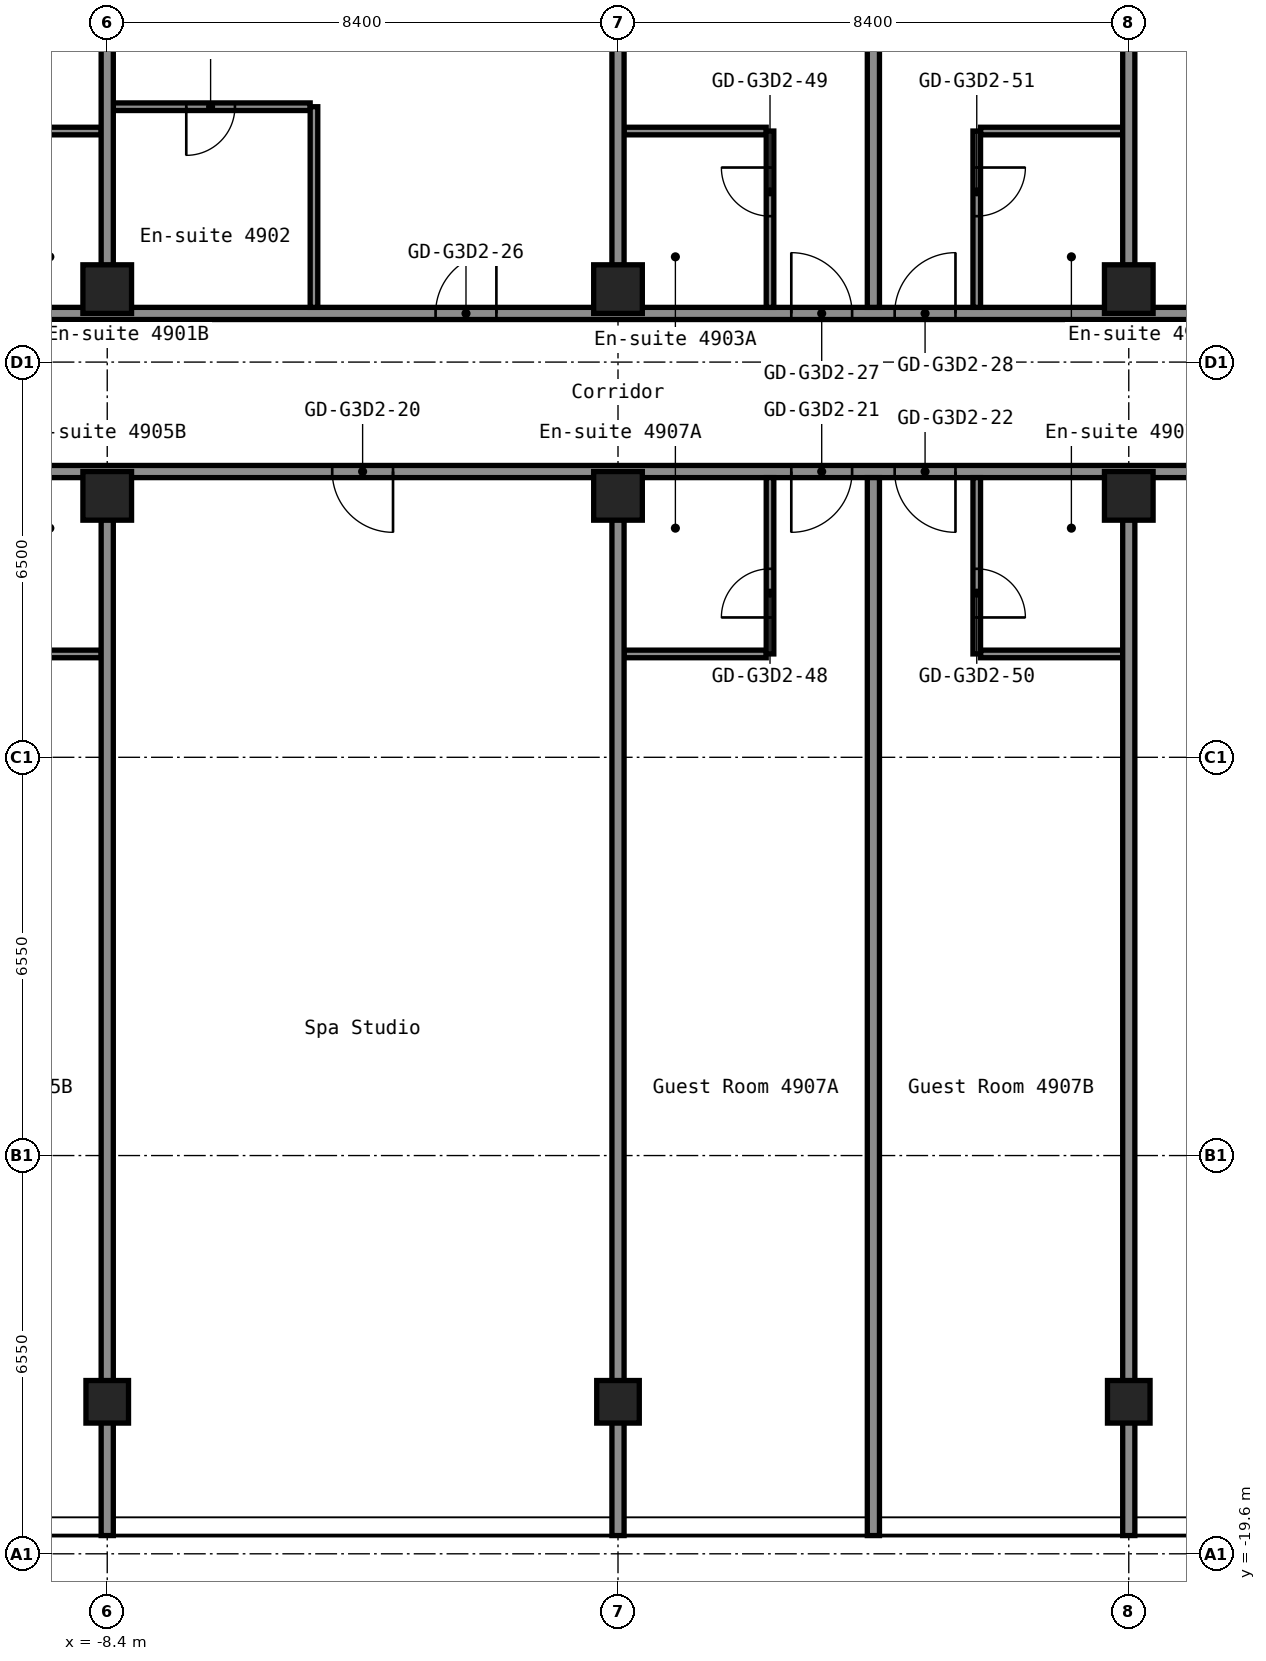
"""IFC4 building model, lengths in metres.
Left out: names, types, materials, properties, quantities, classifications, styles, units other than length and angle.
Written with IfcOpenShell. Run it as: python <this file> out.ifc"""

import sys

from ifc_helpers import new_model, si_unit, direction, frame, frame_2d, origin, origin_2d, place, context, subcontext, project, spatial, rectangle, hollow_rectangle, extrude, element, fill, save


model = new_model("IFC4")
c1 = context("Model", 3, precision=1e-05, world=origin(), true_north=direction((0.0, 1.0)))
c2 = subcontext(c1, "Body", "Model", "MODEL_VIEW")
j1 = project(units=[si_unit("LENGTHUNIT", "METRE"), si_unit("PLANEANGLEUNIT", "RADIAN")], contexts=[c1])
p1 = place(None, origin())
s1 = spatial("IfcSite", under=j1, at=p1, CompositionType="ELEMENT")
p2 = place(p1, origin())
s2 = spatial("IfcBuilding", under=s1, at=p2, CompositionType="ELEMENT")
p3 = place(p2, frame((0.0, 0.0, 172.6)))
s3 = spatial("IfcBuildingStorey", under=s2, at=p3, CompositionType="ELEMENT", Elevation=172.6)
p4 = place(p3, frame((-8.4, -17.1, 0.0), z_axis=(0.0, 0.0, 1.0), x_axis=(1.0, 0.0, 0.0)))
e1 = element("IfcColumn", 1, at=p4, inside=s3, PredefinedType="COLUMN", context=c2, shape_type="SweptSolid", body=[
    extrude(hollow_rectangle(XDim=0.7, YDim=0.7, WallThickness=0.028, at=origin_2d()), origin(), (0.0, 0.0, 1.0), 2.9),
])
for number, where, z_axis, x_axis in (
    (2, (-8.4, -2.2, 0.0), (0.0, 0.0, 1.0), (1.0, 0.0, 0.0)),
    (3, (-8.4, 1.2, 0.0), (0.0, 0.0, 1.0), (1.0, 0.0, 0.0)),
):
    element("IfcColumn", number, at=place(p3, frame(where, z_axis=z_axis, x_axis=x_axis)), inside=s3, PredefinedType="COLUMN", context=c2, shape_type="SweptSolid", body=[
        extrude(hollow_rectangle(XDim=0.8, YDim=0.8, WallThickness=0.032, at=origin_2d()), origin(), (0.0, 0.0, 1.0), 2.9),
    ])
p5 = place(p3, frame((0.0, -17.1, 0.0), z_axis=(0.0, 0.0, 1.0), x_axis=(1.0, 0.0, 0.0)))
e4 = element("IfcColumn", 4, at=p5, inside=s3, PredefinedType="COLUMN", context=c2, shape_type="SweptSolid", body=[
    extrude(hollow_rectangle(XDim=0.7, YDim=0.7, WallThickness=0.028, at=origin_2d()), origin(), (0.0, 0.0, 1.0), 2.9),
])
for number, where, z_axis, x_axis in (
    (5, (0.0, -2.2, 0.0), (0.0, 0.0, 1.0), (1.0, 0.0, 0.0)),
    (6, (0.0, 1.2, 0.0), (0.0, 0.0, 1.0), (1.0, 0.0, 0.0)),
):
    element("IfcColumn", number, at=place(p3, frame(where, z_axis=z_axis, x_axis=x_axis)), inside=s3, PredefinedType="COLUMN", context=c2, shape_type="SweptSolid", body=[
        extrude(hollow_rectangle(XDim=0.8, YDim=0.8, WallThickness=0.032, at=origin_2d()), origin(), (0.0, 0.0, 1.0), 2.9),
    ])
p6 = place(p3, frame((8.4, -17.1, 0.0), z_axis=(0.0, 0.0, 1.0), x_axis=(1.0, 0.0, 0.0)))
e7 = element("IfcColumn", 7, at=p6, inside=s3, PredefinedType="COLUMN", context=c2, shape_type="SweptSolid", body=[
    extrude(hollow_rectangle(XDim=0.7, YDim=0.7, WallThickness=0.028, at=origin_2d()), origin(), (0.0, 0.0, 1.0), 2.9),
])
for number, where, z_axis, x_axis in (
    (8, (8.4, -2.2, 0.0), (0.0, 0.0, 1.0), (1.0, 0.0, 0.0)),
    (9, (8.4, 1.2, 0.0), (0.0, 0.0, 1.0), (1.0, 0.0, 0.0)),
):
    element("IfcColumn", number, at=place(p3, frame(where, z_axis=z_axis, x_axis=x_axis)), inside=s3, PredefinedType="COLUMN", context=c2, shape_type="SweptSolid", body=[
        extrude(hollow_rectangle(XDim=0.8, YDim=0.8, WallThickness=0.032, at=origin_2d()), origin(), (0.0, 0.0, 1.0), 2.9),
    ])
for number, where, z_axis, x_axis in (
    (10, (-10.837, -4.8, 0.0), (0.0, 0.0, 1.0), (1.0, 0.0, 0.0)),
    (11, (0.1, -4.8, 0.0), (0.0, 0.0, 1.0), (1.0, 0.0, 0.0)),
):
    element("IfcWall", number, at=place(p3, frame(where, z_axis=z_axis, x_axis=x_axis)), inside=s3, PredefinedType="PARTITIONING", context=c2, shape_type="SweptSolid", body=[
        extrude(rectangle(XDim=2.337, YDim=0.125, at=frame_2d((1.169, 0.0))), origin(), (0.0, 0.0, 1.0), 2.9),
    ])
p7 = place(p3, frame((5.962, -4.8, 0.0), z_axis=(0.0, 0.0, 1.0), x_axis=(1.0, 0.0, 0.0)))
e12 = element("IfcWall", 12, at=p7, inside=s3, PredefinedType="PARTITIONING", context=c2, shape_type="SweptSolid", body=[
    extrude(rectangle(XDim=2.338, YDim=0.125, at=frame_2d((1.169, 0.0))), origin(), (0.0, 0.0, 1.0), 2.9),
])
p8 = place(p3, frame((-16.8, -1.8, 0.0), z_axis=(0.0, 0.0, 1.0), x_axis=(1.0, 0.0, 0.0)))
e13 = element("IfcWall", 13, at=p8, inside=s3, PredefinedType="PARTITIONING", context=c2, shape_type="SweptSolid", body=[
    extrude(rectangle(XDim=33.6, YDim=0.2, at=frame_2d((16.8, 0.0))), origin(), (0.0, 0.0, 1.0), 2.9),
])
p9 = place(p8, frame((2.85, 0.0, 0.0)))
e14 = element("IfcOpeningElement", 14, at=p9, cuts=e13, PredefinedType="OPENING", context=c2, shape_type="SweptSolid", body=[
    extrude(rectangle(XDim=1.0, YDim=2.1, at=frame_2d((0.5, 1.05))), frame((0.0, 0.11, 0.0), z_axis=(0.0, -1.0, 0.0), x_axis=(1.0, 0.0, 0.0)), (0.0, 0.0, 1.0), 0.22),
])
p10 = place(p8, frame((4.55, 0.0, 0.0)))
e15 = element("IfcOpeningElement", 15, at=p10, cuts=e13, PredefinedType="OPENING", context=c2, shape_type="SweptSolid", body=[
    extrude(rectangle(XDim=1.0, YDim=2.1, at=frame_2d((0.5, 1.05))), frame((0.0, 0.11, 0.0), z_axis=(0.0, -1.0, 0.0), x_axis=(1.0, 0.0, 0.0)), (0.0, 0.0, 1.0), 0.22),
])
p11 = place(p8, frame((12.1, 0.0, 0.0)))
e16 = element("IfcOpeningElement", 16, at=p11, cuts=e13, PredefinedType="OPENING", context=c2, shape_type="SweptSolid", body=[
    extrude(rectangle(XDim=1.0, YDim=2.1, at=frame_2d((0.5, 1.05))), frame((0.0, 0.11, 0.0), z_axis=(0.0, -1.0, 0.0), x_axis=(1.0, 0.0, 0.0)), (0.0, 0.0, 1.0), 0.22),
])
p12 = place(p8, frame((19.65, 0.0, 0.0)))
e17 = element("IfcOpeningElement", 17, at=p12, cuts=e13, PredefinedType="OPENING", context=c2, shape_type="SweptSolid", body=[
    extrude(rectangle(XDim=1.0, YDim=2.1, at=frame_2d((0.5, 1.05))), frame((0.0, 0.11, 0.0), z_axis=(0.0, -1.0, 0.0), x_axis=(1.0, 0.0, 0.0)), (0.0, 0.0, 1.0), 0.22),
])
p13 = place(p8, frame((21.35, 0.0, 0.0)))
e18 = element("IfcOpeningElement", 18, at=p13, cuts=e13, PredefinedType="OPENING", context=c2, shape_type="SweptSolid", body=[
    extrude(rectangle(XDim=1.0, YDim=2.1, at=frame_2d((0.5, 1.05))), frame((0.0, 0.11, 0.0), z_axis=(0.0, -1.0, 0.0), x_axis=(1.0, 0.0, 0.0)), (0.0, 0.0, 1.0), 0.22),
])
p14 = place(p8, frame((27.2, 0.0, 0.0)))
e19 = element("IfcOpeningElement", 19, at=p14, cuts=e13, PredefinedType="OPENING", context=c2, shape_type="SweptSolid", body=[
    extrude(rectangle(XDim=1.0, YDim=2.1, at=frame_2d((0.5, 1.05))), frame((0.0, 0.11, 0.0), z_axis=(0.0, -1.0, 0.0), x_axis=(1.0, 0.0, 0.0)), (0.0, 0.0, 1.0), 0.22),
])
p15 = place(p3, frame((-16.8, 0.8, 0.0), z_axis=(0.0, 0.0, 1.0), x_axis=(1.0, 0.0, 0.0)))
e20 = element("IfcWall", 20, at=p15, inside=s3, PredefinedType="PARTITIONING", context=c2, shape_type="SweptSolid", body=[
    extrude(rectangle(XDim=33.6, YDim=0.2, at=frame_2d((16.8, 0.0))), origin(), (0.0, 0.0, 1.0), 2.9),
])
p16 = place(p15, frame((2.85, 0.0, 0.0)))
e21 = element("IfcOpeningElement", 21, at=p16, cuts=e20, PredefinedType="OPENING", context=c2, shape_type="SweptSolid", body=[
    extrude(rectangle(XDim=1.0, YDim=2.1, at=frame_2d((0.5, 1.05))), frame((0.0, 0.11, 0.0), z_axis=(0.0, -1.0, 0.0), x_axis=(1.0, 0.0, 0.0)), (0.0, 0.0, 1.0), 0.22),
])
p17 = place(p15, frame((4.55, 0.0, 0.0)))
e22 = element("IfcOpeningElement", 22, at=p17, cuts=e20, PredefinedType="OPENING", context=c2, shape_type="SweptSolid", body=[
    extrude(rectangle(XDim=1.0, YDim=2.1, at=frame_2d((0.5, 1.05))), frame((0.0, 0.11, 0.0), z_axis=(0.0, -1.0, 0.0), x_axis=(1.0, 0.0, 0.0)), (0.0, 0.0, 1.0), 0.22),
])
p18 = place(p15, frame((13.8, 0.0, 0.0)))
e23 = element("IfcOpeningElement", 23, at=p18, cuts=e20, PredefinedType="OPENING", context=c2, shape_type="SweptSolid", body=[
    extrude(rectangle(XDim=1.0, YDim=2.1, at=frame_2d((0.5, 1.05))), frame((0.0, 0.11, 0.0), z_axis=(0.0, -1.0, 0.0), x_axis=(1.0, 0.0, 0.0)), (0.0, 0.0, 1.0), 0.22),
])
p19 = place(p15, frame((19.65, 0.0, 0.0)))
e24 = element("IfcOpeningElement", 24, at=p19, cuts=e20, PredefinedType="OPENING", context=c2, shape_type="SweptSolid", body=[
    extrude(rectangle(XDim=1.0, YDim=2.1, at=frame_2d((0.5, 1.05))), frame((0.0, 0.11, 0.0), z_axis=(0.0, -1.0, 0.0), x_axis=(1.0, 0.0, 0.0)), (0.0, 0.0, 1.0), 0.22),
])
p20 = place(p15, frame((21.35, 0.0, 0.0)))
e25 = element("IfcOpeningElement", 25, at=p20, cuts=e20, PredefinedType="OPENING", context=c2, shape_type="SweptSolid", body=[
    extrude(rectangle(XDim=1.0, YDim=2.1, at=frame_2d((0.5, 1.05))), frame((0.0, 0.11, 0.0), z_axis=(0.0, -1.0, 0.0), x_axis=(1.0, 0.0, 0.0)), (0.0, 0.0, 1.0), 0.22),
])
p21 = place(p15, frame((27.1, 0.0, 0.0)))
e26 = element("IfcOpeningElement", 26, at=p21, cuts=e20, PredefinedType="OPENING", context=c2, shape_type="SweptSolid", body=[
    extrude(rectangle(XDim=1.0, YDim=2.1, at=frame_2d((0.5, 1.05))), frame((0.0, 0.11, 0.0), z_axis=(0.0, -1.0, 0.0), x_axis=(1.0, 0.0, 0.0)), (0.0, 0.0, 1.0), 0.22),
])
for number, where, z_axis, x_axis in (
    (27, (-10.837, 3.8, 0.0), (0.0, 0.0, 1.0), (1.0, 0.0, 0.0)),
    (28, (0.1, 3.8, 0.0), (0.0, 0.0, 1.0), (1.0, 0.0, 0.0)),
):
    element("IfcWall", number, at=place(p3, frame(where, z_axis=z_axis, x_axis=x_axis)), inside=s3, PredefinedType="PARTITIONING", context=c2, shape_type="SweptSolid", body=[
        extrude(rectangle(XDim=2.337, YDim=0.125, at=frame_2d((1.169, 0.0))), origin(), (0.0, 0.0, 1.0), 2.9),
    ])
p22 = place(p3, frame((5.962, 3.8, 0.0), z_axis=(0.0, 0.0, 1.0), x_axis=(1.0, 0.0, 0.0)))
e29 = element("IfcWall", 29, at=p22, inside=s3, PredefinedType="PARTITIONING", context=c2, shape_type="SweptSolid", body=[
    extrude(rectangle(XDim=2.338, YDim=0.125, at=frame_2d((1.169, 0.0))), origin(), (0.0, 0.0, 1.0), 2.9),
])
p23 = place(p3, frame((-8.3, 4.2, 0.0), z_axis=(0.0, 0.0, 1.0), x_axis=(1.0, 0.0, 0.0)))
e30 = element("IfcWall", 30, at=p23, inside=s3, PredefinedType="PARTITIONING", context=c2, shape_type="SweptSolid", body=[
    extrude(rectangle(XDim=3.238, YDim=0.125, at=frame_2d((1.619, 0.0))), origin(), (0.0, 0.0, 1.0), 2.9),
])
p24 = place(p23, frame((1.2, 0.0, 0.0)))
e31 = element("IfcOpeningElement", 31, at=p24, cuts=e30, PredefinedType="OPENING", context=c2, shape_type="SweptSolid", body=[
    extrude(rectangle(XDim=0.8, YDim=2.1, at=frame_2d((0.4, 1.05))), frame((0.0, 0.073, 0.0), z_axis=(0.0, -1.0, 0.0), x_axis=(1.0, 0.0, 0.0)), (0.0, 0.0, 1.0), 0.145),
])
for number, where, z_axis, x_axis in (
    (32, (-8.4, -19.3, 0.0), (0.0, 0.0, 1.0), (0.0, 1.0, 0.0)),
    (33, (-8.4, 1.59, 0.0), (0.0, 0.0, 1.0), (0.0, 1.0, 0.0)),
):
    element("IfcWall", number, at=place(p3, frame(where, z_axis=z_axis, x_axis=x_axis)), inside=s3, PredefinedType="PARTITIONING", context=c2, shape_type="SweptSolid", body=[
        extrude(rectangle(XDim=16.71, YDim=0.2, at=frame_2d((8.355, 0.0))), origin(), (0.0, 0.0, 1.0), 2.9),
    ])
p25 = place(p3, frame((-5.0, 0.9, 0.0), z_axis=(0.0, 0.0, 1.0), x_axis=(0.0, 1.0, 0.0)))
e34 = element("IfcWall", 34, at=p25, inside=s3, PredefinedType="PARTITIONING", context=c2, shape_type="SweptSolid", body=[
    extrude(rectangle(XDim=3.3, YDim=0.125, at=frame_2d((1.65, 0.0))), origin(), (0.0, 0.0, 1.0), 2.9),
])
for number, where, z_axis, x_axis in (
    (35, (0.0, -19.3, 0.0), (0.0, 0.0, 1.0), (0.0, 1.0, 0.0)),
    (36, (0.0, 1.59, 0.0), (0.0, 0.0, 1.0), (0.0, 1.0, 0.0)),
):
    element("IfcWall", number, at=place(p3, frame(where, z_axis=z_axis, x_axis=x_axis)), inside=s3, PredefinedType="PARTITIONING", context=c2, shape_type="SweptSolid", body=[
        extrude(rectangle(XDim=16.71, YDim=0.2, at=frame_2d((8.355, 0.0))), origin(), (0.0, 0.0, 1.0), 2.9),
    ])
p26 = place(p3, frame((2.5, -4.8, 0.0), z_axis=(0.0, 0.0, 1.0), x_axis=(0.0, 1.0, 0.0)))
e37 = element("IfcWall", 37, at=p26, inside=s3, PredefinedType="PARTITIONING", context=c2, shape_type="SweptSolid", body=[
    extrude(rectangle(XDim=2.9, YDim=0.125, at=frame_2d((1.45, 0.0))), origin(), (0.0, 0.0, 1.0), 2.9),
])
p27 = place(p26, frame((0.6, 0.0, 0.0)))
e38 = element("IfcOpeningElement", 38, at=p27, cuts=e37, PredefinedType="OPENING", context=c2, shape_type="SweptSolid", body=[
    extrude(rectangle(XDim=0.8, YDim=2.1, at=frame_2d((0.4, 1.05))), frame((0.0, 0.073, 0.0), z_axis=(0.0, -1.0, 0.0), x_axis=(1.0, 0.0, 0.0)), (0.0, 0.0, 1.0), 0.145),
])
p28 = place(p3, frame((2.5, 0.9, 0.0), z_axis=(0.0, 0.0, 1.0), x_axis=(0.0, 1.0, 0.0)))
e39 = element("IfcWall", 39, at=p28, inside=s3, PredefinedType="PARTITIONING", context=c2, shape_type="SweptSolid", body=[
    extrude(rectangle(XDim=2.9, YDim=0.125, at=frame_2d((1.45, 0.0))), origin(), (0.0, 0.0, 1.0), 2.9),
])
p29 = place(p28, frame((1.5, 0.0, 0.0)))
e40 = element("IfcOpeningElement", 40, at=p29, cuts=e39, PredefinedType="OPENING", context=c2, shape_type="SweptSolid", body=[
    extrude(rectangle(XDim=0.8, YDim=2.1, at=frame_2d((0.4, 1.05))), frame((0.0, 0.073, 0.0), z_axis=(0.0, -1.0, 0.0), x_axis=(1.0, 0.0, 0.0)), (0.0, 0.0, 1.0), 0.145),
])
for number, where, z_axis, x_axis in (
    (41, (4.2, -19.3, 0.0), (0.0, 0.0, 1.0), (0.0, 1.0, 0.0)),
    (42, (4.2, 0.9, 0.0), (0.0, 0.0, 1.0), (0.0, 1.0, 0.0)),
):
    element("IfcWall", number, at=place(p3, frame(where, z_axis=z_axis, x_axis=x_axis)), inside=s3, PredefinedType="PARTITIONING", context=c2, shape_type="SweptSolid", body=[
        extrude(rectangle(XDim=17.4, YDim=0.2, at=frame_2d((8.7, 0.0))), origin(), (0.0, 0.0, 1.0), 2.9),
    ])
p30 = place(p3, frame((5.9, -4.8, 0.0), z_axis=(0.0, 0.0, 1.0), x_axis=(0.0, 1.0, 0.0)))
e43 = element("IfcWall", 43, at=p30, inside=s3, PredefinedType="PARTITIONING", context=c2, shape_type="SweptSolid", body=[
    extrude(rectangle(XDim=2.9, YDim=0.125, at=frame_2d((1.45, 0.0))), origin(), (0.0, 0.0, 1.0), 2.9),
])
p31 = place(p30, frame((0.6, 0.0, 0.0)))
e44 = element("IfcOpeningElement", 44, at=p31, cuts=e43, PredefinedType="OPENING", context=c2, shape_type="SweptSolid", body=[
    extrude(rectangle(XDim=0.8, YDim=2.1, at=frame_2d((0.4, 1.05))), frame((0.0, 0.073, 0.0), z_axis=(0.0, -1.0, 0.0), x_axis=(1.0, 0.0, 0.0)), (0.0, 0.0, 1.0), 0.145),
])
p32 = place(p3, frame((5.9, 0.9, 0.0), z_axis=(0.0, 0.0, 1.0), x_axis=(0.0, 1.0, 0.0)))
e45 = element("IfcWall", 45, at=p32, inside=s3, PredefinedType="PARTITIONING", context=c2, shape_type="SweptSolid", body=[
    extrude(rectangle(XDim=2.9, YDim=0.125, at=frame_2d((1.45, 0.0))), origin(), (0.0, 0.0, 1.0), 2.9),
])
p33 = place(p32, frame((1.5, 0.0, 0.0)))
e46 = element("IfcOpeningElement", 46, at=p33, cuts=e45, PredefinedType="OPENING", context=c2, shape_type="SweptSolid", body=[
    extrude(rectangle(XDim=0.8, YDim=2.1, at=frame_2d((0.4, 1.05))), frame((0.0, 0.073, 0.0), z_axis=(0.0, -1.0, 0.0), x_axis=(1.0, 0.0, 0.0)), (0.0, 0.0, 1.0), 0.145),
])
for number, where, z_axis, x_axis in (
    (47, (8.4, -19.3, 0.0), (0.0, 0.0, 1.0), (0.0, 1.0, 0.0)),
    (48, (8.4, 1.59, 0.0), (0.0, 0.0, 1.0), (0.0, 1.0, 0.0)),
):
    element("IfcWall", number, at=place(p3, frame(where, z_axis=z_axis, x_axis=x_axis)), inside=s3, PredefinedType="PARTITIONING", context=c2, shape_type="SweptSolid", body=[
        extrude(rectangle(XDim=16.71, YDim=0.2, at=frame_2d((8.355, 0.0))), origin(), (0.0, 0.0, 1.0), 2.9),
    ])
p34 = place(p11, origin())
e49 = element("IfcDoor", 49, at=p34, inside=s3, OperationType="SINGLE_SWING_RIGHT", PredefinedType="DOOR", context=c2, shape_type="SweptSolid", body=[
    extrude(rectangle(XDim=1.0, YDim=2.1, at=frame_2d((0.5, 1.05))), frame((0.0, 0.025, 0.0), z_axis=(0.0, -1.0, 0.0), x_axis=(1.0, 0.0, 0.0)), (0.0, 0.0, 1.0), 0.05),
])
fill(e16, e49)
p35 = place(p12, origin())
e50 = element("IfcDoor", 50, at=p35, inside=s3, OperationType="SINGLE_SWING_LEFT", PredefinedType="DOOR", context=c2, shape_type="SweptSolid", body=[
    extrude(rectangle(XDim=1.0, YDim=2.1, at=frame_2d((0.5, 1.05))), frame((0.0, 0.025, 0.0), z_axis=(0.0, -1.0, 0.0), x_axis=(1.0, 0.0, 0.0)), (0.0, 0.0, 1.0), 0.05),
])
fill(e17, e50)
p36 = place(p13, origin())
e51 = element("IfcDoor", 51, at=p36, inside=s3, OperationType="SINGLE_SWING_RIGHT", PredefinedType="DOOR", context=c2, shape_type="SweptSolid", body=[
    extrude(rectangle(XDim=1.0, YDim=2.1, at=frame_2d((0.5, 1.05))), frame((0.0, 0.025, 0.0), z_axis=(0.0, -1.0, 0.0), x_axis=(1.0, 0.0, 0.0)), (0.0, 0.0, 1.0), 0.05),
])
fill(e18, e51)
p37 = place(p18, origin())
e52 = element("IfcDoor", 52, at=p37, inside=s3, OperationType="SINGLE_SWING_LEFT", PredefinedType="DOOR", context=c2, shape_type="SweptSolid", body=[
    extrude(rectangle(XDim=1.0, YDim=2.1, at=frame_2d((0.5, 1.05))), frame((0.0, 0.025, 0.0), z_axis=(0.0, -1.0, 0.0), x_axis=(1.0, 0.0, 0.0)), (0.0, 0.0, 1.0), 0.05),
])
fill(e23, e52)
p38 = place(p19, origin())
e53 = element("IfcDoor", 53, at=p38, inside=s3, OperationType="SINGLE_SWING_RIGHT", PredefinedType="DOOR", context=c2, shape_type="SweptSolid", body=[
    extrude(rectangle(XDim=1.0, YDim=2.1, at=frame_2d((0.5, 1.05))), frame((0.0, 0.025, 0.0), z_axis=(0.0, -1.0, 0.0), x_axis=(1.0, 0.0, 0.0)), (0.0, 0.0, 1.0), 0.05),
])
fill(e24, e53)
p39 = place(p20, origin())
e54 = element("IfcDoor", 54, at=p39, inside=s3, OperationType="SINGLE_SWING_LEFT", PredefinedType="DOOR", context=c2, shape_type="SweptSolid", body=[
    extrude(rectangle(XDim=1.0, YDim=2.1, at=frame_2d((0.5, 1.05))), frame((0.0, 0.025, 0.0), z_axis=(0.0, -1.0, 0.0), x_axis=(1.0, 0.0, 0.0)), (0.0, 0.0, 1.0), 0.05),
])
fill(e25, e54)
p40 = place(p24, origin())
e55 = element("IfcDoor", 55, at=p40, inside=s3, OperationType="SINGLE_SWING_LEFT", PredefinedType="DOOR", context=c2, shape_type="SweptSolid", body=[
    extrude(rectangle(XDim=0.8, YDim=2.1, at=frame_2d((0.4, 1.05))), frame((0.0, 0.025, 0.0), z_axis=(0.0, -1.0, 0.0), x_axis=(1.0, 0.0, 0.0)), (0.0, 0.0, 1.0), 0.05),
])
fill(e31, e55)
p41 = place(p27, origin())
e56 = element("IfcDoor", 56, at=p41, inside=s3, OperationType="SINGLE_SWING_RIGHT", PredefinedType="DOOR", context=c2, shape_type="SweptSolid", body=[
    extrude(rectangle(XDim=0.8, YDim=2.1, at=frame_2d((0.4, 1.05))), frame((0.0, 0.025, 0.0), z_axis=(0.0, -1.0, 0.0), x_axis=(1.0, 0.0, 0.0)), (0.0, 0.0, 1.0), 0.05),
])
fill(e38, e56)
p42 = place(p29, origin())
e57 = element("IfcDoor", 57, at=p42, inside=s3, OperationType="SINGLE_SWING_LEFT", PredefinedType="DOOR", context=c2, shape_type="SweptSolid", body=[
    extrude(rectangle(XDim=0.8, YDim=2.1, at=frame_2d((0.4, 1.05))), frame((0.0, 0.025, 0.0), z_axis=(0.0, -1.0, 0.0), x_axis=(1.0, 0.0, 0.0)), (0.0, 0.0, 1.0), 0.05),
])
fill(e40, e57)
p43 = place(p31, origin())
e58 = element("IfcDoor", 58, at=p43, inside=s3, OperationType="SINGLE_SWING_LEFT", PredefinedType="DOOR", context=c2, shape_type="SweptSolid", body=[
    extrude(rectangle(XDim=0.8, YDim=2.1, at=frame_2d((0.4, 1.05))), frame((0.0, 0.025, 0.0), z_axis=(0.0, -1.0, 0.0), x_axis=(1.0, 0.0, 0.0)), (0.0, 0.0, 1.0), 0.05),
])
fill(e44, e58)
p44 = place(p33, origin())
e59 = element("IfcDoor", 59, at=p44, inside=s3, OperationType="SINGLE_SWING_RIGHT", PredefinedType="DOOR", context=c2, shape_type="SweptSolid", body=[
    extrude(rectangle(XDim=0.8, YDim=2.1, at=frame_2d((0.4, 1.05))), frame((0.0, 0.025, 0.0), z_axis=(0.0, -1.0, 0.0), x_axis=(1.0, 0.0, 0.0)), (0.0, 0.0, 1.0), 0.05),
])
fill(e46, e59)
save(model, sys.argv[1])
